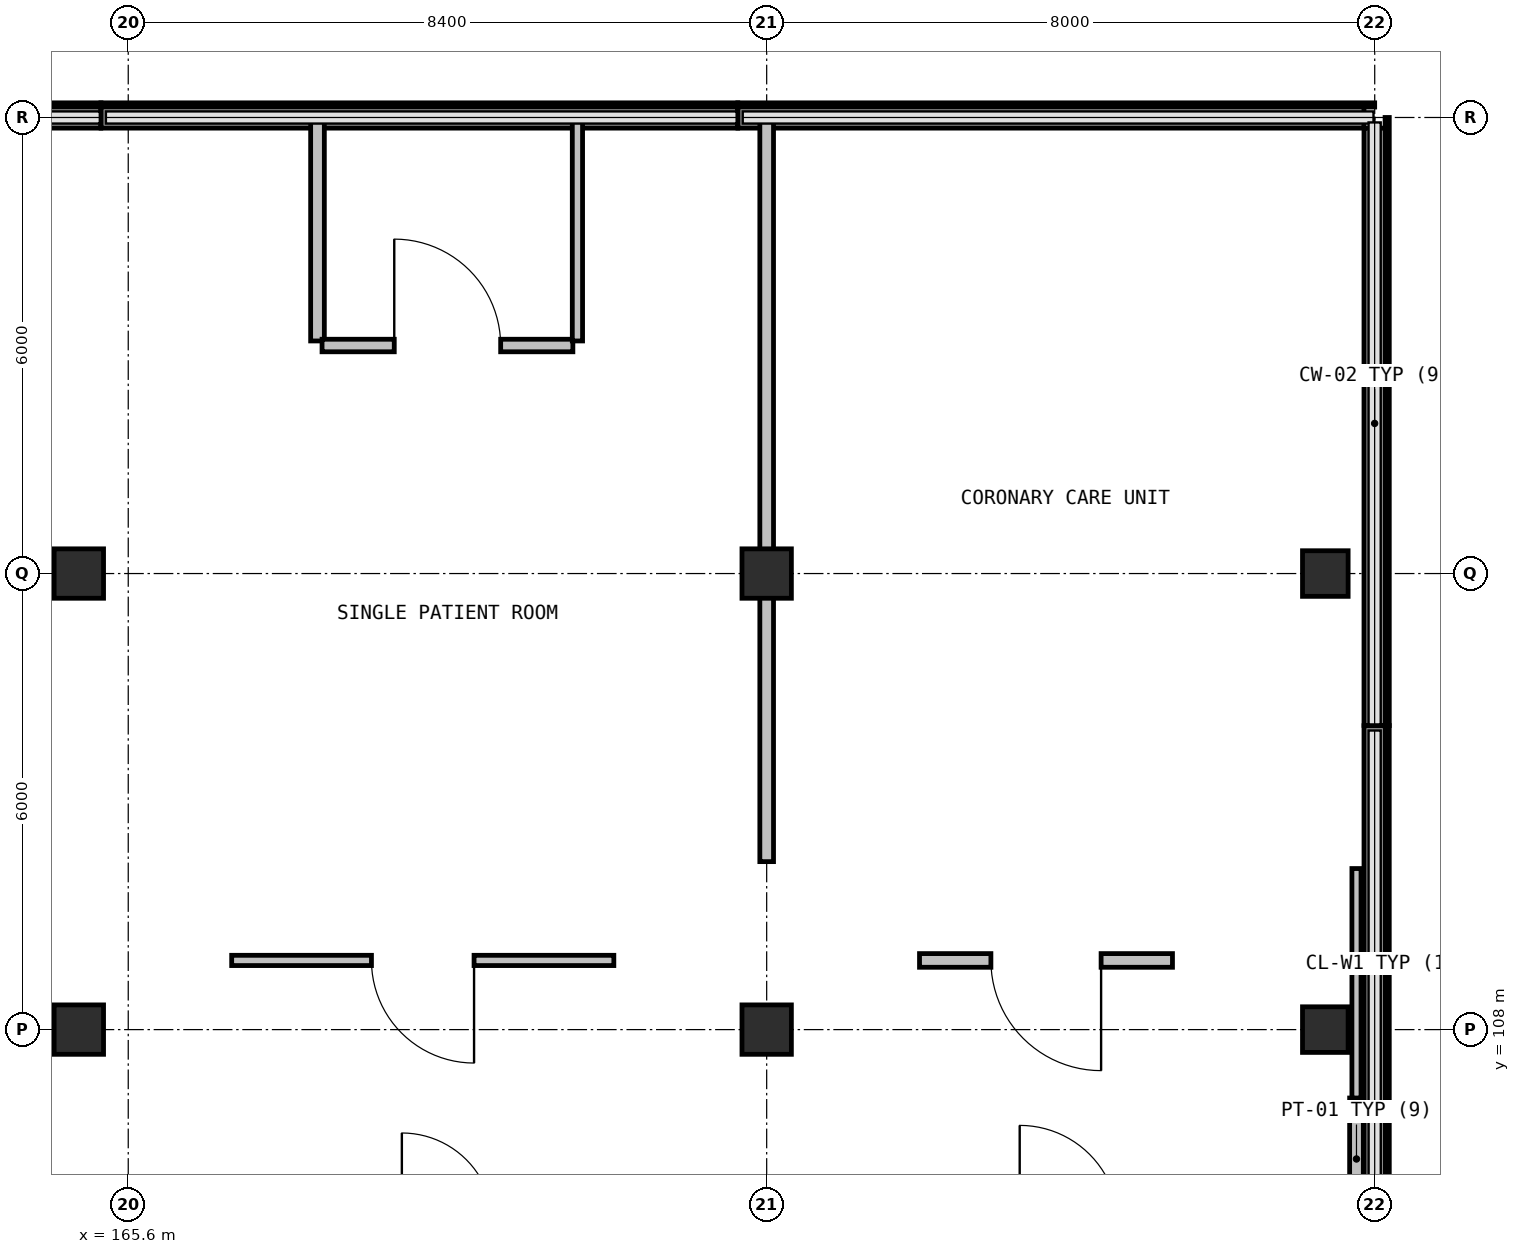
"""IFC4 building model, lengths in metres.
Left out: names, types, materials, properties, quantities, classifications, styles, units other than length and angle.
Written with IfcOpenShell. Run it as: python <this file> out.ifc"""

import sys

from ifc_helpers import new_model, si_unit, direction, frame, frame_2d, origin, origin_2d, place, context, subcontext, project, spatial, rectangle, extrude, element, fill, save


model = new_model("IFC4")
c1 = context("Model", 3, precision=1e-05, world=origin(), true_north=direction((0.0, 1.0)))
c2 = subcontext(c1, "Body", "Model", "MODEL_VIEW")
j1 = project(units=[si_unit("LENGTHUNIT", "METRE"), si_unit("PLANEANGLEUNIT", "RADIAN")], contexts=[c1])
p1 = place(None, origin())
s1 = spatial("IfcSite", under=j1, at=p1, CompositionType="ELEMENT")
p2 = place(p1, origin())
s2 = spatial("IfcBuilding", under=s1, at=p2, CompositionType="ELEMENT")
p3 = place(p2, frame((0.0, 0.0, 27.3)))
s3 = spatial("IfcBuildingStorey", under=s2, at=p3, CompositionType="ELEMENT", Elevation=27.3)
for number, where, z_axis, x_axis in (
    (1, (164.95, 108.0, 0.0), (0.0, 0.0, 1.0), (1.0, 0.0, 0.0)),
    (2, (164.95, 114.0, 0.0), (0.0, 0.0, 1.0), (1.0, 0.0, 0.0)),
):
    element("IfcColumn", number, at=place(p3, frame(where, z_axis=z_axis, x_axis=x_axis)), inside=s3, PredefinedType="COLUMN", context=c2, shape_type="SweptSolid", body=[
        extrude(rectangle(XDim=0.65, YDim=0.65, at=origin_2d()), origin(), (0.0, 0.0, 1.0), 4.05),
    ])
for number, where, z_axis, x_axis in (
    (3, (174.0, 108.0, 0.0), (0.0, 0.0, 1.0), (1.0, 0.0, 0.0)),
    (4, (174.0, 114.0, 0.0), (0.0, 0.0, 1.0), (1.0, 0.0, 0.0)),
):
    element("IfcColumn", number, at=place(p3, frame(where, z_axis=z_axis, x_axis=x_axis)), inside=s3, PredefinedType="COLUMN", context=c2, shape_type="SweptSolid", body=[
        extrude(rectangle(XDim=0.65, YDim=0.65, at=origin_2d()), origin(), (0.0, 0.0, 1.0), 3.778),
    ])
for number, where, z_axis, x_axis in (
    (5, (181.35, 108.0, 0.0), (0.0, 0.0, 1.0), (1.0, 0.0, 0.0)),
    (6, (181.35, 114.0, 0.0), (0.0, 0.0, 1.0), (1.0, 0.0, 0.0)),
):
    element("IfcColumn", number, at=place(p3, frame(where, z_axis=z_axis, x_axis=x_axis)), inside=s3, PredefinedType="COLUMN", context=c2, shape_type="SweptSolid", body=[
        extrude(rectangle(XDim=0.6, YDim=0.6, at=origin_2d()), origin(), (0.0, 0.0, 1.0), 3.778),
    ])
for number, where, z_axis, x_axis in (
    (7, (156.864, 120.0, 0.0), (0.0, 0.0, 1.0), (1.0, 0.0, 0.0)),
    (8, (165.243, 120.0, 0.0), (0.0, 0.0, 1.0), (1.0, 0.0, 0.0)),
):
    element("IfcWall", number, at=place(p3, frame(where, z_axis=z_axis, x_axis=x_axis)), inside=s3, PredefinedType="SOLIDWALL", context=c2, shape_type="SweptSolid", body=[
        extrude(rectangle(XDim=8.375, YDim=0.28, at=frame_2d((4.188, 0.0))), origin(), (0.0, 0.0, 1.0), 0.94),
    ])
p4 = place(p3, frame((173.622, 120.0, 0.0), z_axis=(0.0, 0.0, 1.0), x_axis=(1.0, 0.0, 0.0)))
e9 = element("IfcWall", 9, at=p4, inside=s3, PredefinedType="SOLIDWALL", context=c2, shape_type="SweptSolid", body=[
    extrude(rectangle(XDim=8.237, YDim=0.28, at=frame_2d((4.118, 0.0))), origin(), (0.0, 0.0, 1.0), 0.94),
])
p5 = place(p3, frame((181.999, 119.86, 0.0), z_axis=(0.0, 0.0, 1.0), x_axis=(0.0, -1.0, 0.0)))
e10 = element("IfcWall", 10, at=p5, inside=s3, PredefinedType="SOLIDWALL", context=c2, shape_type="SweptSolid", body=[
    extrude(rectangle(XDim=7.858, YDim=0.28, at=frame_2d((3.929, 0.0))), origin(), (0.0, 0.0, 1.0), 0.94),
])
p6 = place(p3, frame((181.999, 111.998, 0.0), z_axis=(0.0, 0.0, 1.0), x_axis=(0.000122144863, -0.99999999254, 0.0)))
e11 = element("IfcWall", 11, at=p6, inside=s3, PredefinedType="SOLIDWALL", context=c2, shape_type="SweptSolid", body=[
    extrude(rectangle(XDim=7.995, YDim=0.28, at=frame_2d((3.998, 0.0))), origin(), (0.0, 0.0, 1.0), 0.94),
])
p7 = place(p3, frame((181.76, 105.496, 0.0), z_axis=(0.0, 0.0, 1.0), x_axis=(0.0, 1.0, 0.0)))
e12 = element("IfcWall", 12, at=p7, inside=s3, PredefinedType="PARTITIONING", context=c2, shape_type="SweptSolid", body=[
    extrude(rectangle(XDim=1.604, YDim=0.18, at=frame_2d((0.802, 0.0))), origin(), (0.0, 0.0, 1.0), 3.78),
])
p8 = place(p3, frame((171.989, 108.91, 0.0), z_axis=(0.0, 0.0, 1.0), x_axis=(-1.0, 0.0, 0.0)))
e13 = element("IfcWall", 13, at=p8, inside=s3, PredefinedType="PARTITIONING", context=c2, shape_type="SweptSolid", body=[
    extrude(rectangle(XDim=5.028, YDim=0.135, at=frame_2d((2.514, 0.0))), origin(), (0.0, 0.0, 1.0), 3.78),
])
p9 = place(p8, frame((1.839, 0.0, 0.0)))
e14 = element("IfcOpeningElement", 14, at=p9, cuts=e13, PredefinedType="OPENING", context=c2, shape_type="SweptSolid", body=[
    extrude(rectangle(XDim=1.35, YDim=2.15, at=frame_2d((0.675, 1.075))), frame((0.0, 0.077, 0.0), z_axis=(0.0, -1.0, 0.0), x_axis=(1.0, 0.0, 0.0)), (0.0, 0.0, 1.0), 0.155),
])
p10 = place(p3, frame((168.09, 119.958, 0.0), z_axis=(0.0, 0.0, 1.0), x_axis=(0.0, -1.0, 0.0)))
e15 = element("IfcWall", 15, at=p10, inside=s3, PredefinedType="PARTITIONING", context=c2, shape_type="SweptSolid", body=[
    extrude(rectangle(XDim=2.898, YDim=0.18, at=frame_2d((1.449, 0.0))), origin(), (0.0, 0.0, 1.0), 3.78),
])
p11 = place(p3, frame((168.15, 117.0, 0.0), z_axis=(0.0, 0.0, 1.0), x_axis=(1.0, 0.0, 0.0)))
e16 = element("IfcWall", 16, at=p11, inside=s3, PredefinedType="PARTITIONING", context=c2, shape_type="SweptSolid", body=[
    extrude(rectangle(XDim=3.3, YDim=0.165, at=frame_2d((1.65, 0.0))), origin(), (0.0, 0.0, 1.0), 3.78),
])
p12 = place(p11, frame((0.95, 0.0, 0.0)))
e17 = element("IfcOpeningElement", 17, at=p12, cuts=e16, PredefinedType="OPENING", context=c2, shape_type="SweptSolid", body=[
    extrude(rectangle(XDim=1.4, YDim=2.15, at=frame_2d((0.7, 1.075))), frame((0.0, 0.093, 0.0), z_axis=(0.0, -1.0, 0.0), x_axis=(1.0, 0.0, 0.0)), (0.0, 0.0, 1.0), 0.185),
])
p13 = place(p3, frame((171.51, 117.06, 0.0), z_axis=(0.0, 0.0, 1.0), x_axis=(0.0, 1.0, 0.0)))
e18 = element("IfcWall", 18, at=p13, inside=s3, PredefinedType="PARTITIONING", context=c2, shape_type="SweptSolid", body=[
    extrude(rectangle(XDim=2.898, YDim=0.135, at=frame_2d((1.449, 0.0))), origin(), (0.0, 0.0, 1.0), 3.78),
])
p14 = place(p3, frame((174.0, 119.958, 0.0), z_axis=(0.0, 0.0, 1.0), x_axis=(0.0, -1.0, 0.0)))
e19 = element("IfcWall", 19, at=p14, inside=s3, PredefinedType="PARTITIONING", context=c2, shape_type="SweptSolid", body=[
    extrude(rectangle(XDim=9.748, YDim=0.18, at=frame_2d((4.874, 0.0))), origin(), (0.0, 0.0, 1.0), 3.178),
])
p15 = place(p3, frame((181.76, 107.1, 0.0), z_axis=(0.0, 0.0, 1.0), x_axis=(0.0, 1.0, 0.0)))
e20 = element("IfcWall", 20, at=p15, inside=s3, PredefinedType="PARTITIONING", context=c2, shape_type="SweptSolid", body=[
    extrude(rectangle(XDim=3.019, YDim=0.12, at=frame_2d((1.509, 0.0))), origin(), (0.0, 0.0, 1.0), 3.78),
])
p16 = place(p3, frame((179.339, 108.91, 0.0), z_axis=(0.0, 0.0, 1.0), x_axis=(-1.0, 0.0, 0.0)))
e21 = element("IfcWall", 21, at=p16, inside=s3, PredefinedType="PARTITIONING", context=c2, shape_type="SweptSolid", body=[
    extrude(rectangle(XDim=3.328, YDim=0.18, at=frame_2d((1.664, 0.0))), origin(), (0.0, 0.0, 1.0), 3.78),
])
p17 = place(p16, frame((0.939, 0.0, 0.0)))
e22 = element("IfcOpeningElement", 22, at=p17, cuts=e21, PredefinedType="OPENING", context=c2, shape_type="SweptSolid", body=[
    extrude(rectangle(XDim=1.45, YDim=2.15, at=frame_2d((0.725, 1.075))), frame((0.0, 0.1, 0.0), z_axis=(0.0, -1.0, 0.0), x_axis=(1.0, 0.0, 0.0)), (0.0, 0.0, 1.0), 0.2),
])
p18 = place(p9, origin())
e23 = element("IfcDoor", 23, at=p18, inside=s3, OperationType="SINGLE_SWING_RIGHT", PredefinedType="DOOR", context=c2, shape_type="SweptSolid", body=[
    extrude(rectangle(XDim=1.35, YDim=2.15, at=frame_2d((0.675, 1.075))), frame((0.0, 0.025, 0.0), z_axis=(0.0, -1.0, 0.0), x_axis=(1.0, 0.0, 0.0)), (0.0, 0.0, 1.0), 0.05),
])
fill(e14, e23)
p19 = place(p12, origin())
e24 = element("IfcDoor", 24, at=p19, inside=s3, OperationType="SINGLE_SWING_LEFT", PredefinedType="DOOR", context=c2, shape_type="SweptSolid", body=[
    extrude(rectangle(XDim=1.4, YDim=2.15, at=frame_2d((0.7, 1.075))), frame((0.0, 0.025, 0.0), z_axis=(0.0, -1.0, 0.0), x_axis=(1.0, 0.0, 0.0)), (0.0, 0.0, 1.0), 0.05),
])
fill(e17, e24)
p20 = place(p17, origin())
e25 = element("IfcDoor", 25, at=p20, inside=s3, OperationType="SINGLE_SWING_RIGHT", PredefinedType="DOOR", context=c2, shape_type="SweptSolid", body=[
    extrude(rectangle(XDim=1.45, YDim=2.15, at=frame_2d((0.725, 1.075))), frame((0.0, 0.025, 0.0), z_axis=(0.0, -1.0, 0.0), x_axis=(1.0, 0.0, 0.0)), (0.0, 0.0, 1.0), 0.05),
])
fill(e22, e25)
save(model, sys.argv[1])
